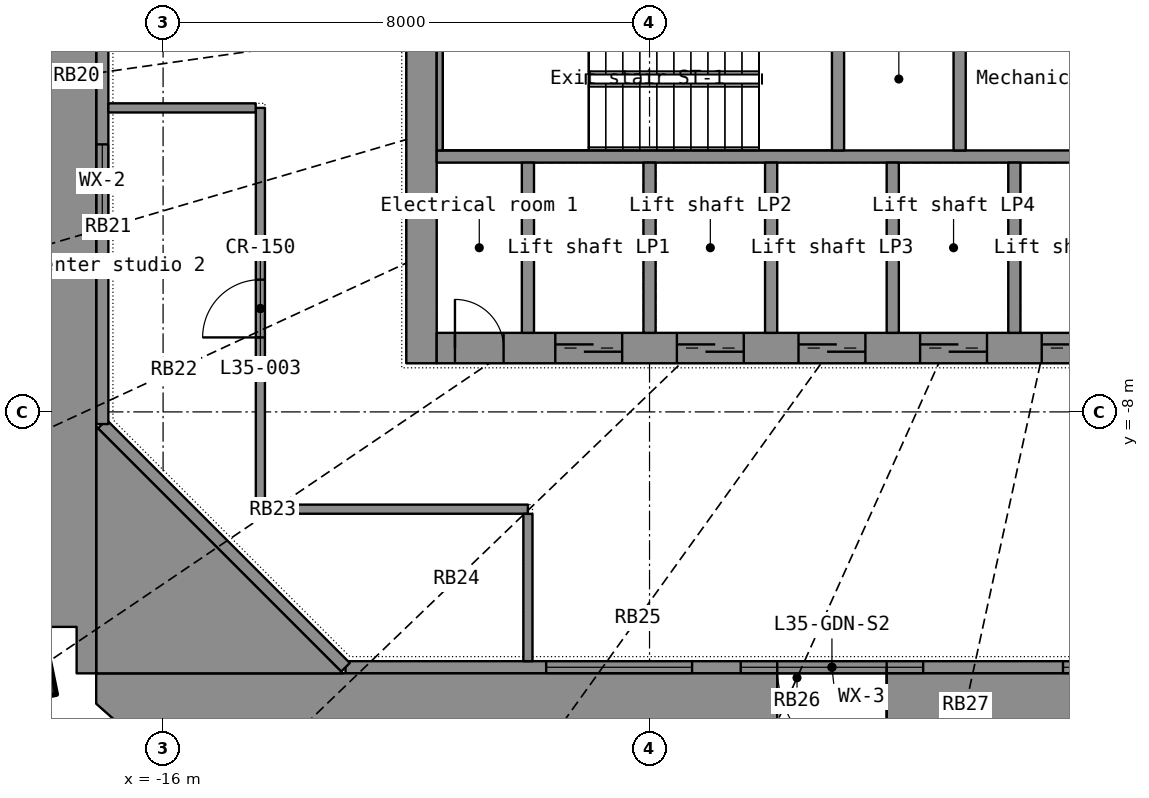
"""IFC4 building model, lengths in metres.
Left out: names, types, materials, properties, quantities, classifications, styles, units other than length and angle.
Written with IfcOpenShell. Run it as: python <this file> out.ifc"""

import sys

from ifc_helpers import new_model, si_unit, direction, frame, frame_2d, origin, origin_2d, place, context, subcontext, project, spatial, polyline, rectangle, hollow_rectangle, outline, extrude, element, fill, save


model = new_model("IFC4")
c1 = context("Model", 3, precision=1e-05, world=origin(), true_north=direction((0.0, 1.0)))
c2 = subcontext(c1, "Body", "Model", "MODEL_VIEW")
j1 = project(units=[si_unit("LENGTHUNIT", "METRE"), si_unit("PLANEANGLEUNIT", "RADIAN")], contexts=[c1])
p1 = place(None, origin())
s1 = spatial("IfcSite", under=j1, at=p1, CompositionType="ELEMENT")
p2 = place(p1, origin())
s2 = spatial("IfcBuilding", under=s1, at=p2, CompositionType="ELEMENT")
p3 = place(p2, frame((0.0, 0.0, 145.2)))
s3 = spatial("IfcBuildingStorey", under=s2, at=p3, CompositionType="ELEMENT", Elevation=145.2)
p4 = place(p3, frame((-18.222, -12.336, 0.0), z_axis=(0.026511305, 0.018201791, 0.999482789), x_axis=(-0.720044306, 0.693898, 0.00646247)))
e1 = element("IfcColumn", 1, at=p4, inside=s3, PredefinedType="COLUMN", context=c2, shape_type="SweptSolid", body=[
    extrude(hollow_rectangle(XDim=0.8, YDim=0.8, WallThickness=0.025, at=origin_2d()), origin(), (0.0, 0.0, 1.0), 7.404),
])
p5 = place(p3, frame((13.0, -12.2, 0.08), z_axis=(0.0, 0.0, 1.0), x_axis=(-1.0, 0.0, 0.0)))
e2 = element("IfcWall", 2, at=p5, inside=s3, PredefinedType="STANDARD", context=c2, shape_type="SweptSolid", body=[
    extrude(rectangle(XDim=26.0, YDim=0.2, at=frame_2d((13.0, 0.0))), origin(), (0.0, 0.0, 1.0), 7.12),
])
p6 = place(p5, frame((7.1, 0.0, 0.0)))
e3 = element("IfcOpeningElement", 3, at=p6, cuts=e2, PredefinedType="OPENING", context=c2, shape_type="SweptSolid", body=[
    extrude(rectangle(XDim=1.8, YDim=2.4, at=frame_2d((0.9, 1.2))), frame((0.0, 0.11, 0.0), z_axis=(0.0, -1.0, 0.0), x_axis=(1.0, 0.0, 0.0)), (0.0, 0.0, 1.0), 0.22),
])
p7 = place(p5, frame((17.1, 0.0, 0.0)))
e4 = element("IfcOpeningElement", 4, at=p7, cuts=e2, PredefinedType="OPENING", context=c2, shape_type="SweptSolid", body=[
    extrude(rectangle(XDim=1.8, YDim=2.4, at=frame_2d((0.9, 1.2))), frame((0.0, 0.11, 0.0), z_axis=(0.0, -1.0, 0.0), x_axis=(1.0, 0.0, 0.0)), (0.0, 0.0, 1.0), 0.22),
])
p8 = place(p5, frame((3.3, 0.0, 0.9)))
e5 = element("IfcOpeningElement", 5, at=p8, cuts=e2, PredefinedType="OPENING", context=c2, shape_type="SweptSolid", body=[
    extrude(rectangle(XDim=2.4, YDim=1.5, at=frame_2d((1.2, 0.75))), frame((0.0, 0.11, 0.0), z_axis=(0.0, -1.0, 0.0), x_axis=(1.0, 0.0, 0.0)), (0.0, 0.0, 1.0), 0.22),
])
p9 = place(p5, frame((11.8, 0.0, 0.9)))
e6 = element("IfcOpeningElement", 6, at=p9, cuts=e2, PredefinedType="OPENING", context=c2, shape_type="SweptSolid", body=[
    extrude(rectangle(XDim=2.4, YDim=1.5, at=frame_2d((1.2, 0.75))), frame((0.0, 0.11, 0.0), z_axis=(0.0, -1.0, 0.0), x_axis=(1.0, 0.0, 0.0)), (0.0, 0.0, 1.0), 0.22),
])
p10 = place(p5, frame((20.3, 0.0, 0.9)))
e7 = element("IfcOpeningElement", 7, at=p10, cuts=e2, PredefinedType="OPENING", context=c2, shape_type="SweptSolid", body=[
    extrude(rectangle(XDim=2.4, YDim=1.5, at=frame_2d((1.2, 0.75))), frame((0.0, 0.11, 0.0), z_axis=(0.0, -1.0, 0.0), x_axis=(1.0, 0.0, 0.0)), (0.0, 0.0, 1.0), 0.22),
])
p11 = place(p5, frame((6.5, 0.0, 3.2)))
e8 = element("IfcOpeningElement", 8, at=p11, cuts=e2, PredefinedType="OPENING", context=c2, shape_type="SweptSolid", body=[
    extrude(rectangle(XDim=3.0, YDim=1.0, at=frame_2d((1.5, 0.5))), frame((0.0, 0.11, 0.0), z_axis=(0.0, -1.0, 0.0), x_axis=(1.0, 0.0, 0.0)), (0.0, 0.0, 1.0), 0.22),
])
p12 = place(p5, frame((16.5, 0.0, 3.2)))
e9 = element("IfcOpeningElement", 9, at=p12, cuts=e2, PredefinedType="OPENING", context=c2, shape_type="SweptSolid", body=[
    extrude(rectangle(XDim=3.0, YDim=1.0, at=frame_2d((1.5, 0.5))), frame((0.0, 0.11, 0.0), z_axis=(0.0, -1.0, 0.0), x_axis=(1.0, 0.0, 0.0)), (0.0, 0.0, 1.0), 0.22),
])
p13 = place(p3, frame((-13.0, -12.2, 0.08), z_axis=(0.0, 0.0, 1.0), x_axis=(-0.707106781, 0.707106781, 0.0)))
e10 = element("IfcWall", 10, at=p13, inside=s3, PredefinedType="STANDARD", context=c2, shape_type="SweptSolid", body=[
    extrude(rectangle(XDim=5.657, YDim=0.2, at=frame_2d((2.828, 0.0))), origin(), (0.0, 0.0, 1.0), 7.12),
])
p14 = place(p3, frame((-17.0, -8.2, 0.08), z_axis=(0.0, 0.0, 1.0), x_axis=(0.0, 1.0, 0.0)))
e11 = element("IfcWall", 11, at=p14, inside=s3, PredefinedType="STANDARD", context=c2, shape_type="SweptSolid", body=[
    extrude(rectangle(XDim=16.4, YDim=0.2, at=frame_2d((8.2, 0.0))), origin(), (0.0, 0.0, 1.0), 7.12),
])
p15 = place(p14, frame((7.3, 0.0, 0.0)))
e12 = element("IfcOpeningElement", 12, at=p15, cuts=e11, PredefinedType="OPENING", context=c2, shape_type="SweptSolid", body=[
    extrude(rectangle(XDim=1.8, YDim=2.4, at=frame_2d((0.9, 1.2))), frame((0.0, 0.11, 0.0), z_axis=(0.0, -1.0, 0.0), x_axis=(1.0, 0.0, 0.0)), (0.0, 0.0, 1.0), 0.22),
])
p16 = place(p14, frame((3.4, 0.0, 0.1)))
e13 = element("IfcOpeningElement", 13, at=p16, cuts=e11, PredefinedType="OPENING", context=c2, shape_type="SweptSolid", body=[
    extrude(rectangle(XDim=1.2, YDim=2.2, at=frame_2d((0.6, 1.1))), frame((0.0, 0.11, 0.0), z_axis=(0.0, -1.0, 0.0), x_axis=(1.0, 0.0, 0.0)), (0.0, 0.0, 1.0), 0.22),
])
p17 = place(p14, frame((11.8, 0.0, 0.1)))
e14 = element("IfcOpeningElement", 14, at=p17, cuts=e11, PredefinedType="OPENING", context=c2, shape_type="SweptSolid", body=[
    extrude(rectangle(XDim=1.2, YDim=2.2, at=frame_2d((0.6, 1.1))), frame((0.0, 0.11, 0.0), z_axis=(0.0, -1.0, 0.0), x_axis=(1.0, 0.0, 0.0)), (0.0, 0.0, 1.0), 0.22),
])
p18 = place(p3, frame((0.0, 0.0, -0.4)))
e15 = element("IfcWall", 15, at=p18, inside=s3, PredefinedType="ELEMENTEDWALL", context=c2, shape_type="SweptSolid", body=[
    extrude(outline(polyline([(2.031, -18.808), (3.343, -18.668), (3.343, -18.185), (4.1, -18.185), (4.1, -12.3), (-4.1, -12.3), (-4.1, -18.185), (-3.343, -18.185), (-3.343, -18.668), (-2.031, -18.808), (-1.025, -18.844), (-1.025, -17.957), (1.025, -17.957), (1.025, -18.844), (2.031, -18.808)])), origin(), (0.0, 0.0, 1.0), 1.58),
])
p19 = place(p3, frame((0.0, 0.0, -0.4)))
e16 = element("IfcWall", 16, at=p19, inside=s3, PredefinedType="ELEMENTEDWALL", context=c2, shape_type="SweptSolid", body=[
    extrude(outline(polyline([(-7.357, -17.898), (-6.031, -18.236), (-5.9, -18.26), (-5.9, -12.3), (-13.042, -12.3), (-17.1, -12.3), (-17.1, -12.8), (-16.478, -13.35), (-15.704, -13.924), (-14.506, -13.924), (-14.506, -14.757), (-13.366, -15.465), (-12.813, -15.75), (-12.813, -15.372), (-10.763, -15.372), (-10.763, -16.725), (-9.848, -17.111), (-8.957, -17.41), (-8.957, -17.304), (-7.357, -17.304), (-7.357, -17.898)])), origin(), (0.0, 0.0, 1.0), 1.58),
])
p20 = place(p3, frame((0.0, 0.0, -0.4)))
e17 = element("IfcWall", 17, at=p20, inside=s3, PredefinedType="ELEMENTEDWALL", context=c2, shape_type="SweptSolid", body=[
    extrude(outline(polyline([(-17.1, -8.241), (-17.1, -12.3), (-13.042, -12.3), (-17.1, -8.241)])), origin(), (0.0, 0.0, 1.0), 1.58),
])
p21 = place(p3, frame((0.0, 0.0, -0.4)))
e18 = element("IfcWall", 18, at=p21, inside=s3, PredefinedType="ELEMENTEDWALL", context=c2, shape_type="SweptSolid", body=[
    extrude(outline(polyline([(-17.422, -12.3), (-17.1, -12.3), (-17.1, -8.241), (-17.1, -0.9), (-22.392, -0.9), (-22.392, -1.025), (-23.248, -1.025), (-23.214, -1.646), (-23.072, -2.519), (-22.562, -2.519), (-22.562, -4.119), (-22.719, -4.119), (-22.509, -4.886), (-22.175, -5.744), (-21.507, -5.744), (-21.507, -7.221), (-21.119, -7.979), (-20.86, -8.382), (-19.308, -8.382), (-19.308, -10.432), (-19.4, -10.432), (-19.088, -10.829), (-18.419, -11.536), (-17.422, -11.536), (-17.422, -12.3)])), origin(), (0.0, 0.0, 1.0), 1.58),
])
p22 = place(p3, frame((-11.75, -7.2, 0.0), z_axis=(0.0, 0.0, 1.0), x_axis=(0.0, 1.0, 0.0)))
e19 = element("IfcWall", 19, at=p22, inside=s3, PredefinedType="SHEAR", context=c2, shape_type="SweptSolid", body=[
    extrude(rectangle(XDim=14.4, YDim=0.5, at=frame_2d((7.2, 0.0))), origin(), (0.0, 0.0, 1.0), 7.0),
])
p23 = place(p22, frame((6.5, 0.0, 0.0)))
e20 = element("IfcOpeningElement", 20, at=p23, cuts=e19, PredefinedType="OPENING", context=c2, shape_type="SweptSolid", body=[
    extrude(rectangle(XDim=1.4, YDim=2.2, at=frame_2d((0.7, 1.1))), frame((0.0, 0.26, 0.0), z_axis=(0.0, -1.0, 0.0), x_axis=(1.0, 0.0, 0.0)), (0.0, 0.0, 1.0), 0.52),
])
p24 = place(p3, frame((-11.5, -6.95, 0.0), z_axis=(0.0, 0.0, 1.0), x_axis=(1.0, 0.0, 0.0)))
e21 = element("IfcWall", 21, at=p24, inside=s3, PredefinedType="SHEAR", context=c2, shape_type="SweptSolid", body=[
    extrude(rectangle(XDim=23.0, YDim=0.5, at=frame_2d((11.5, 0.0))), origin(), (0.0, 0.0, 1.0), 7.0),
])
p25 = place(p24, frame((1.95, 0.0, 0.0)))
e22 = element("IfcOpeningElement", 22, at=p25, cuts=e21, PredefinedType="OPENING", context=c2, shape_type="SweptSolid", body=[
    extrude(rectangle(XDim=1.1, YDim=2.2, at=frame_2d((0.55, 1.1))), frame((0.0, 0.26, 0.0), z_axis=(0.0, -1.0, 0.0), x_axis=(1.0, 0.0, 0.0)), (0.0, 0.0, 1.0), 0.52),
])
p26 = place(p24, frame((3.95, 0.0, 0.0)))
e23 = element("IfcOpeningElement", 23, at=p26, cuts=e21, PredefinedType="OPENING", context=c2, shape_type="SweptSolid", body=[
    extrude(rectangle(XDim=1.1, YDim=2.2, at=frame_2d((0.55, 1.1))), frame((0.0, 0.26, 0.0), z_axis=(0.0, -1.0, 0.0), x_axis=(1.0, 0.0, 0.0)), (0.0, 0.0, 1.0), 0.52),
])
p27 = place(p24, frame((5.95, 0.0, 0.0)))
e24 = element("IfcOpeningElement", 24, at=p27, cuts=e21, PredefinedType="OPENING", context=c2, shape_type="SweptSolid", body=[
    extrude(rectangle(XDim=1.1, YDim=2.2, at=frame_2d((0.55, 1.1))), frame((0.0, 0.26, 0.0), z_axis=(0.0, -1.0, 0.0), x_axis=(1.0, 0.0, 0.0)), (0.0, 0.0, 1.0), 0.52),
])
p28 = place(p24, frame((7.95, 0.0, 0.0)))
e25 = element("IfcOpeningElement", 25, at=p28, cuts=e21, PredefinedType="OPENING", context=c2, shape_type="SweptSolid", body=[
    extrude(rectangle(XDim=1.1, YDim=2.2, at=frame_2d((0.55, 1.1))), frame((0.0, 0.26, 0.0), z_axis=(0.0, -1.0, 0.0), x_axis=(1.0, 0.0, 0.0)), (0.0, 0.0, 1.0), 0.52),
])
p29 = place(p24, frame((9.95, 0.0, 0.0)))
e26 = element("IfcOpeningElement", 26, at=p29, cuts=e21, PredefinedType="OPENING", context=c2, shape_type="SweptSolid", body=[
    extrude(rectangle(XDim=1.1, YDim=2.2, at=frame_2d((0.55, 1.1))), frame((0.0, 0.26, 0.0), z_axis=(0.0, -1.0, 0.0), x_axis=(1.0, 0.0, 0.0)), (0.0, 0.0, 1.0), 0.52),
])
p30 = place(p24, frame((11.95, 0.0, 0.0)))
e27 = element("IfcOpeningElement", 27, at=p30, cuts=e21, PredefinedType="OPENING", context=c2, shape_type="SweptSolid", body=[
    extrude(rectangle(XDim=1.1, YDim=2.2, at=frame_2d((0.55, 1.1))), frame((0.0, 0.26, 0.0), z_axis=(0.0, -1.0, 0.0), x_axis=(1.0, 0.0, 0.0)), (0.0, 0.0, 1.0), 0.52),
])
p31 = place(p24, frame((13.95, 0.0, 0.0)))
e28 = element("IfcOpeningElement", 28, at=p31, cuts=e21, PredefinedType="OPENING", context=c2, shape_type="SweptSolid", body=[
    extrude(rectangle(XDim=1.1, YDim=2.2, at=frame_2d((0.55, 1.1))), frame((0.0, 0.26, 0.0), z_axis=(0.0, -1.0, 0.0), x_axis=(1.0, 0.0, 0.0)), (0.0, 0.0, 1.0), 0.52),
])
p32 = place(p24, frame((15.95, 0.0, 0.0)))
e29 = element("IfcOpeningElement", 29, at=p32, cuts=e21, PredefinedType="OPENING", context=c2, shape_type="SweptSolid", body=[
    extrude(rectangle(XDim=1.1, YDim=2.2, at=frame_2d((0.55, 1.1))), frame((0.0, 0.26, 0.0), z_axis=(0.0, -1.0, 0.0), x_axis=(1.0, 0.0, 0.0)), (0.0, 0.0, 1.0), 0.52),
])
p33 = place(p24, frame((17.95, 0.0, 0.0)))
e30 = element("IfcOpeningElement", 30, at=p33, cuts=e21, PredefinedType="OPENING", context=c2, shape_type="SweptSolid", body=[
    extrude(rectangle(XDim=1.1, YDim=2.2, at=frame_2d((0.55, 1.1))), frame((0.0, 0.26, 0.0), z_axis=(0.0, -1.0, 0.0), x_axis=(1.0, 0.0, 0.0)), (0.0, 0.0, 1.0), 0.52),
])
p34 = place(p24, frame((19.95, 0.0, 0.0)))
e31 = element("IfcOpeningElement", 31, at=p34, cuts=e21, PredefinedType="OPENING", context=c2, shape_type="SweptSolid", body=[
    extrude(rectangle(XDim=1.1, YDim=2.2, at=frame_2d((0.55, 1.1))), frame((0.0, 0.26, 0.0), z_axis=(0.0, -1.0, 0.0), x_axis=(1.0, 0.0, 0.0)), (0.0, 0.0, 1.0), 0.52),
])
p35 = place(p24, frame((0.3, 0.0, 0.0)))
e32 = element("IfcOpeningElement", 32, at=p35, cuts=e21, PredefinedType="OPENING", context=c2, shape_type="SweptSolid", body=[
    extrude(rectangle(XDim=0.8, YDim=2.05, at=frame_2d((0.4, 1.025))), frame((0.0, 0.26, 0.0), z_axis=(0.0, -1.0, 0.0), x_axis=(1.0, 0.0, 0.0)), (0.0, 0.0, 1.0), 0.52),
])
p36 = place(p24, frame((21.9, 0.0, 0.0)))
e33 = element("IfcOpeningElement", 33, at=p36, cuts=e21, PredefinedType="OPENING", context=c2, shape_type="SweptSolid", body=[
    extrude(rectangle(XDim=0.8, YDim=2.05, at=frame_2d((0.4, 1.025))), frame((0.0, 0.26, 0.0), z_axis=(0.0, -1.0, 0.0), x_axis=(1.0, 0.0, 0.0)), (0.0, 0.0, 1.0), 0.52),
])
p37 = place(p3, frame((-11.5, -3.8, 0.0), z_axis=(0.0, 0.0, 1.0), x_axis=(1.0, 0.0, 0.0)))
e34 = element("IfcWall", 34, at=p37, inside=s3, PredefinedType="SHEAR", context=c2, shape_type="SweptSolid", body=[
    extrude(rectangle(XDim=23.0, YDim=0.2, at=frame_2d((11.5, 0.0))), origin(), (0.0, 0.0, 1.0), 7.0),
])
for number, where, z_axis, x_axis in (
    (35, (-10.0, -6.7, 0.0), (0.0, 0.0, 1.0), (0.0, 1.0, 0.0)),
    (36, (-8.0, -6.7, 0.0), (0.0, 0.0, 1.0), (0.0, 1.0, 0.0)),
    (37, (-6.0, -6.7, 0.0), (0.0, 0.0, 1.0), (0.0, 1.0, 0.0)),
    (38, (-4.0, -6.7, 0.0), (0.0, 0.0, 1.0), (0.0, 1.0, 0.0)),
    (39, (-2.0, -6.7, 0.0), (0.0, 0.0, 1.0), (0.0, 1.0, 0.0)),
):
    element("IfcWall", number, at=place(p3, frame(where, z_axis=z_axis, x_axis=x_axis)), inside=s3, PredefinedType="SHEAR", context=c2, shape_type="SweptSolid", body=[
        extrude(rectangle(XDim=2.8, YDim=0.2, at=frame_2d((1.4, 0.0))), origin(), (0.0, 0.0, 1.0), 7.0),
    ])
p38 = place(p3, frame((-2.9, -3.7, 0.0), z_axis=(0.0, 0.0, 1.0), x_axis=(0.0, 1.0, 0.0)))
e40 = element("IfcWall", 40, at=p38, inside=s3, PredefinedType="SHEAR", context=c2, shape_type="SweptSolid", body=[
    extrude(rectangle(XDim=7.4, YDim=0.2, at=frame_2d((3.7, 0.0))), origin(), (0.0, 0.0, 1.0), 7.0),
])
p39 = place(p38, frame((3.1, 0.0, 0.0)))
e41 = element("IfcOpeningElement", 41, at=p39, cuts=e40, PredefinedType="OPENING", context=c2, shape_type="SweptSolid", body=[
    extrude(rectangle(XDim=1.2, YDim=2.2, at=frame_2d((0.6, 1.1))), frame((0.0, 0.11, 0.0), z_axis=(0.0, -1.0, 0.0), x_axis=(1.0, 0.0, 0.0)), (0.0, 0.0, 1.0), 0.22),
])
p40 = place(p3, frame((-11.45, -3.7, 0.0), z_axis=(0.0, 0.0, 1.0), x_axis=(0.0, 1.0, 0.0)))
e42 = element("IfcWall", 42, at=p40, inside=s3, PredefinedType="SHEAR", context=c2, shape_type="SweptSolid", body=[
    extrude(rectangle(XDim=2.35, YDim=0.1, at=frame_2d((1.175, 0.0))), origin(), (0.0, 0.0, 1.0), 7.0),
])
p41 = place(p3, frame((-4.9, -3.7, 0.0), z_axis=(0.0, 0.0, 1.0), x_axis=(0.0, 1.0, 0.0)))
e43 = element("IfcWall", 43, at=p41, inside=s3, PredefinedType="SHEAR", context=c2, shape_type="SweptSolid", body=[
    extrude(rectangle(XDim=2.35, YDim=0.2, at=frame_2d((1.175, 0.0))), origin(), (0.0, 0.0, 1.0), 7.0),
])
p42 = place(p3, frame((-14.4, -9.6, 0.0), z_axis=(0.0, 0.0, 1.0), x_axis=(0.0, 1.0, 0.0)))
e44 = element("IfcWall", 44, at=p42, inside=s3, PredefinedType="PARTITIONING", context=c2, shape_type="SweptSolid", body=[
    extrude(rectangle(XDim=6.6, YDim=0.15, at=frame_2d((3.3, 0.0))), origin(), (0.0, 0.0, 1.0), 6.1),
])
p43 = place(p42, frame((2.825, 0.0, 0.0)))
e45 = element("IfcOpeningElement", 45, at=p43, cuts=e44, PredefinedType="OPENING", context=c2, shape_type="SweptSolid", body=[
    extrude(rectangle(XDim=0.95, YDim=2.15, at=frame_2d((0.475, 1.075))), frame((0.0, 0.085, 0.0), z_axis=(0.0, -1.0, 0.0), x_axis=(1.0, 0.0, 0.0)), (0.0, 0.0, 1.0), 0.17),
])
p44 = place(p3, frame((-10.0, -9.6, 0.0), z_axis=(0.0, 0.0, 1.0), x_axis=(-1.0, 0.0, 0.0)))
e46 = element("IfcWall", 46, at=p44, inside=s3, PredefinedType="PARTITIONING", context=c2, shape_type="SweptSolid", body=[
    extrude(rectangle(XDim=4.323, YDim=0.15, at=frame_2d((2.162, 0.0))), origin(), (0.0, 0.0, 1.0), 6.1),
])
p45 = place(p3, frame((-10.0, -12.1, 0.0), z_axis=(0.0, 0.0, 1.0), x_axis=(0.0, 1.0, 0.0)))
e47 = element("IfcWall", 47, at=p45, inside=s3, PredefinedType="PARTITIONING", context=c2, shape_type="SweptSolid", body=[
    extrude(rectangle(XDim=2.423, YDim=0.15, at=frame_2d((1.211, 0.0))), origin(), (0.0, 0.0, 1.0), 6.1),
])
p46 = place(p3, frame((-14.477, -3.0, 0.0), z_axis=(0.0, 0.0, 1.0), x_axis=(-1.0, 0.0, 0.0)))
e48 = element("IfcWall", 48, at=p46, inside=s3, PredefinedType="PARTITIONING", context=c2, shape_type="SweptSolid", body=[
    extrude(rectangle(XDim=2.423, YDim=0.15, at=frame_2d((1.211, 0.0))), origin(), (0.0, 0.0, 1.0), 6.1),
])
p47 = place(p7, origin())
e49 = element("IfcDoor", 49, at=p47, inside=s3, OperationType="DOUBLE_DOOR_SINGLE_SWING", PredefinedType="DOOR", context=c2, shape_type="SweptSolid", body=[
    extrude(rectangle(XDim=1.8, YDim=2.4, at=frame_2d((0.9, 1.2))), frame((0.0, 0.025, 0.0), z_axis=(0.0, -1.0, 0.0), x_axis=(1.0, 0.0, 0.0)), (0.0, 0.0, 1.0), 0.05),
])
fill(e4, e49)
p48 = place(p9, origin())
e50 = element("IfcWindow", 50, at=p48, inside=s3, PartitioningType="SINGLE_PANEL", PredefinedType="WINDOW", context=c2, shape_type="SweptSolid", body=[
    extrude(rectangle(XDim=2.4, YDim=1.5, at=frame_2d((1.2, 0.75))), frame((0.0, 0.03, 0.0), z_axis=(0.0, -1.0, 0.0), x_axis=(1.0, 0.0, 0.0)), (0.0, 0.0, 1.0), 0.06),
])
fill(e6, e50)
p49 = place(p10, origin())
e51 = element("IfcWindow", 51, at=p49, inside=s3, PartitioningType="SINGLE_PANEL", PredefinedType="WINDOW", context=c2, shape_type="SweptSolid", body=[
    extrude(rectangle(XDim=2.4, YDim=1.5, at=frame_2d((1.2, 0.75))), frame((0.0, 0.03, 0.0), z_axis=(0.0, -1.0, 0.0), x_axis=(1.0, 0.0, 0.0)), (0.0, 0.0, 1.0), 0.06),
])
fill(e7, e51)
p50 = place(p12, origin())
e52 = element("IfcWindow", 52, at=p50, inside=s3, PartitioningType="SINGLE_PANEL", PredefinedType="WINDOW", context=c2, shape_type="SweptSolid", body=[
    extrude(rectangle(XDim=3.0, YDim=1.0, at=frame_2d((1.5, 0.5))), frame((0.0, 0.03, 0.0), z_axis=(0.0, -1.0, 0.0), x_axis=(1.0, 0.0, 0.0)), (0.0, 0.0, 1.0), 0.06),
])
fill(e9, e52)
p51 = place(p16, origin())
e53 = element("IfcWindow", 53, at=p51, inside=s3, PartitioningType="SINGLE_PANEL", PredefinedType="WINDOW", context=c2, shape_type="SweptSolid", body=[
    extrude(rectangle(XDim=1.2, YDim=2.2, at=frame_2d((0.6, 1.1))), frame((0.0, 0.03, 0.0), z_axis=(0.0, -1.0, 0.0), x_axis=(1.0, 0.0, 0.0)), (0.0, 0.0, 1.0), 0.06),
])
fill(e13, e53)
p52 = place(p25, origin())
e54 = element("IfcDoor", 54, at=p52, inside=s3, OperationType="DOUBLE_DOOR_SLIDING", PredefinedType="DOOR", context=c2, shape_type="SweptSolid", body=[
    extrude(rectangle(XDim=1.1, YDim=2.2, at=frame_2d((0.55, 1.1))), frame((0.0, 0.025, 0.0), z_axis=(0.0, -1.0, 0.0), x_axis=(1.0, 0.0, 0.0)), (0.0, 0.0, 1.0), 0.05),
])
fill(e22, e54)
p53 = place(p26, origin())
e55 = element("IfcDoor", 55, at=p53, inside=s3, OperationType="DOUBLE_DOOR_SLIDING", PredefinedType="DOOR", context=c2, shape_type="SweptSolid", body=[
    extrude(rectangle(XDim=1.1, YDim=2.2, at=frame_2d((0.55, 1.1))), frame((0.0, 0.025, 0.0), z_axis=(0.0, -1.0, 0.0), x_axis=(1.0, 0.0, 0.0)), (0.0, 0.0, 1.0), 0.05),
])
fill(e23, e55)
p54 = place(p27, origin())
e56 = element("IfcDoor", 56, at=p54, inside=s3, OperationType="DOUBLE_DOOR_SLIDING", PredefinedType="DOOR", context=c2, shape_type="SweptSolid", body=[
    extrude(rectangle(XDim=1.1, YDim=2.2, at=frame_2d((0.55, 1.1))), frame((0.0, 0.025, 0.0), z_axis=(0.0, -1.0, 0.0), x_axis=(1.0, 0.0, 0.0)), (0.0, 0.0, 1.0), 0.05),
])
fill(e24, e56)
p55 = place(p28, origin())
e57 = element("IfcDoor", 57, at=p55, inside=s3, OperationType="DOUBLE_DOOR_SLIDING", PredefinedType="DOOR", context=c2, shape_type="SweptSolid", body=[
    extrude(rectangle(XDim=1.1, YDim=2.2, at=frame_2d((0.55, 1.1))), frame((0.0, 0.025, 0.0), z_axis=(0.0, -1.0, 0.0), x_axis=(1.0, 0.0, 0.0)), (0.0, 0.0, 1.0), 0.05),
])
fill(e25, e57)
p56 = place(p29, origin())
e58 = element("IfcDoor", 58, at=p56, inside=s3, OperationType="DOUBLE_DOOR_SLIDING", PredefinedType="DOOR", context=c2, shape_type="SweptSolid", body=[
    extrude(rectangle(XDim=1.1, YDim=2.2, at=frame_2d((0.55, 1.1))), frame((0.0, 0.025, 0.0), z_axis=(0.0, -1.0, 0.0), x_axis=(1.0, 0.0, 0.0)), (0.0, 0.0, 1.0), 0.05),
])
fill(e26, e58)
p57 = place(p35, origin())
e59 = element("IfcDoor", 59, at=p57, inside=s3, OperationType="SINGLE_SWING_LEFT", PredefinedType="DOOR", context=c2, shape_type="SweptSolid", body=[
    extrude(rectangle(XDim=0.8, YDim=2.05, at=frame_2d((0.4, 1.025))), frame((0.0, 0.025, 0.0), z_axis=(0.0, -1.0, 0.0), x_axis=(1.0, 0.0, 0.0)), (0.0, 0.0, 1.0), 0.05),
])
fill(e32, e59)
p58 = place(p43, origin())
e60 = element("IfcDoor", 60, at=p58, inside=s3, OperationType="SINGLE_SWING_LEFT", PredefinedType="DOOR", context=c2, shape_type="SweptSolid", body=[
    extrude(rectangle(XDim=0.95, YDim=2.15, at=frame_2d((0.475, 1.075))), frame((0.0, 0.025, 0.0), z_axis=(0.0, -1.0, 0.0), x_axis=(1.0, 0.0, 0.0)), (0.0, 0.0, 1.0), 0.05),
])
fill(e45, e60)
save(model, sys.argv[1])
